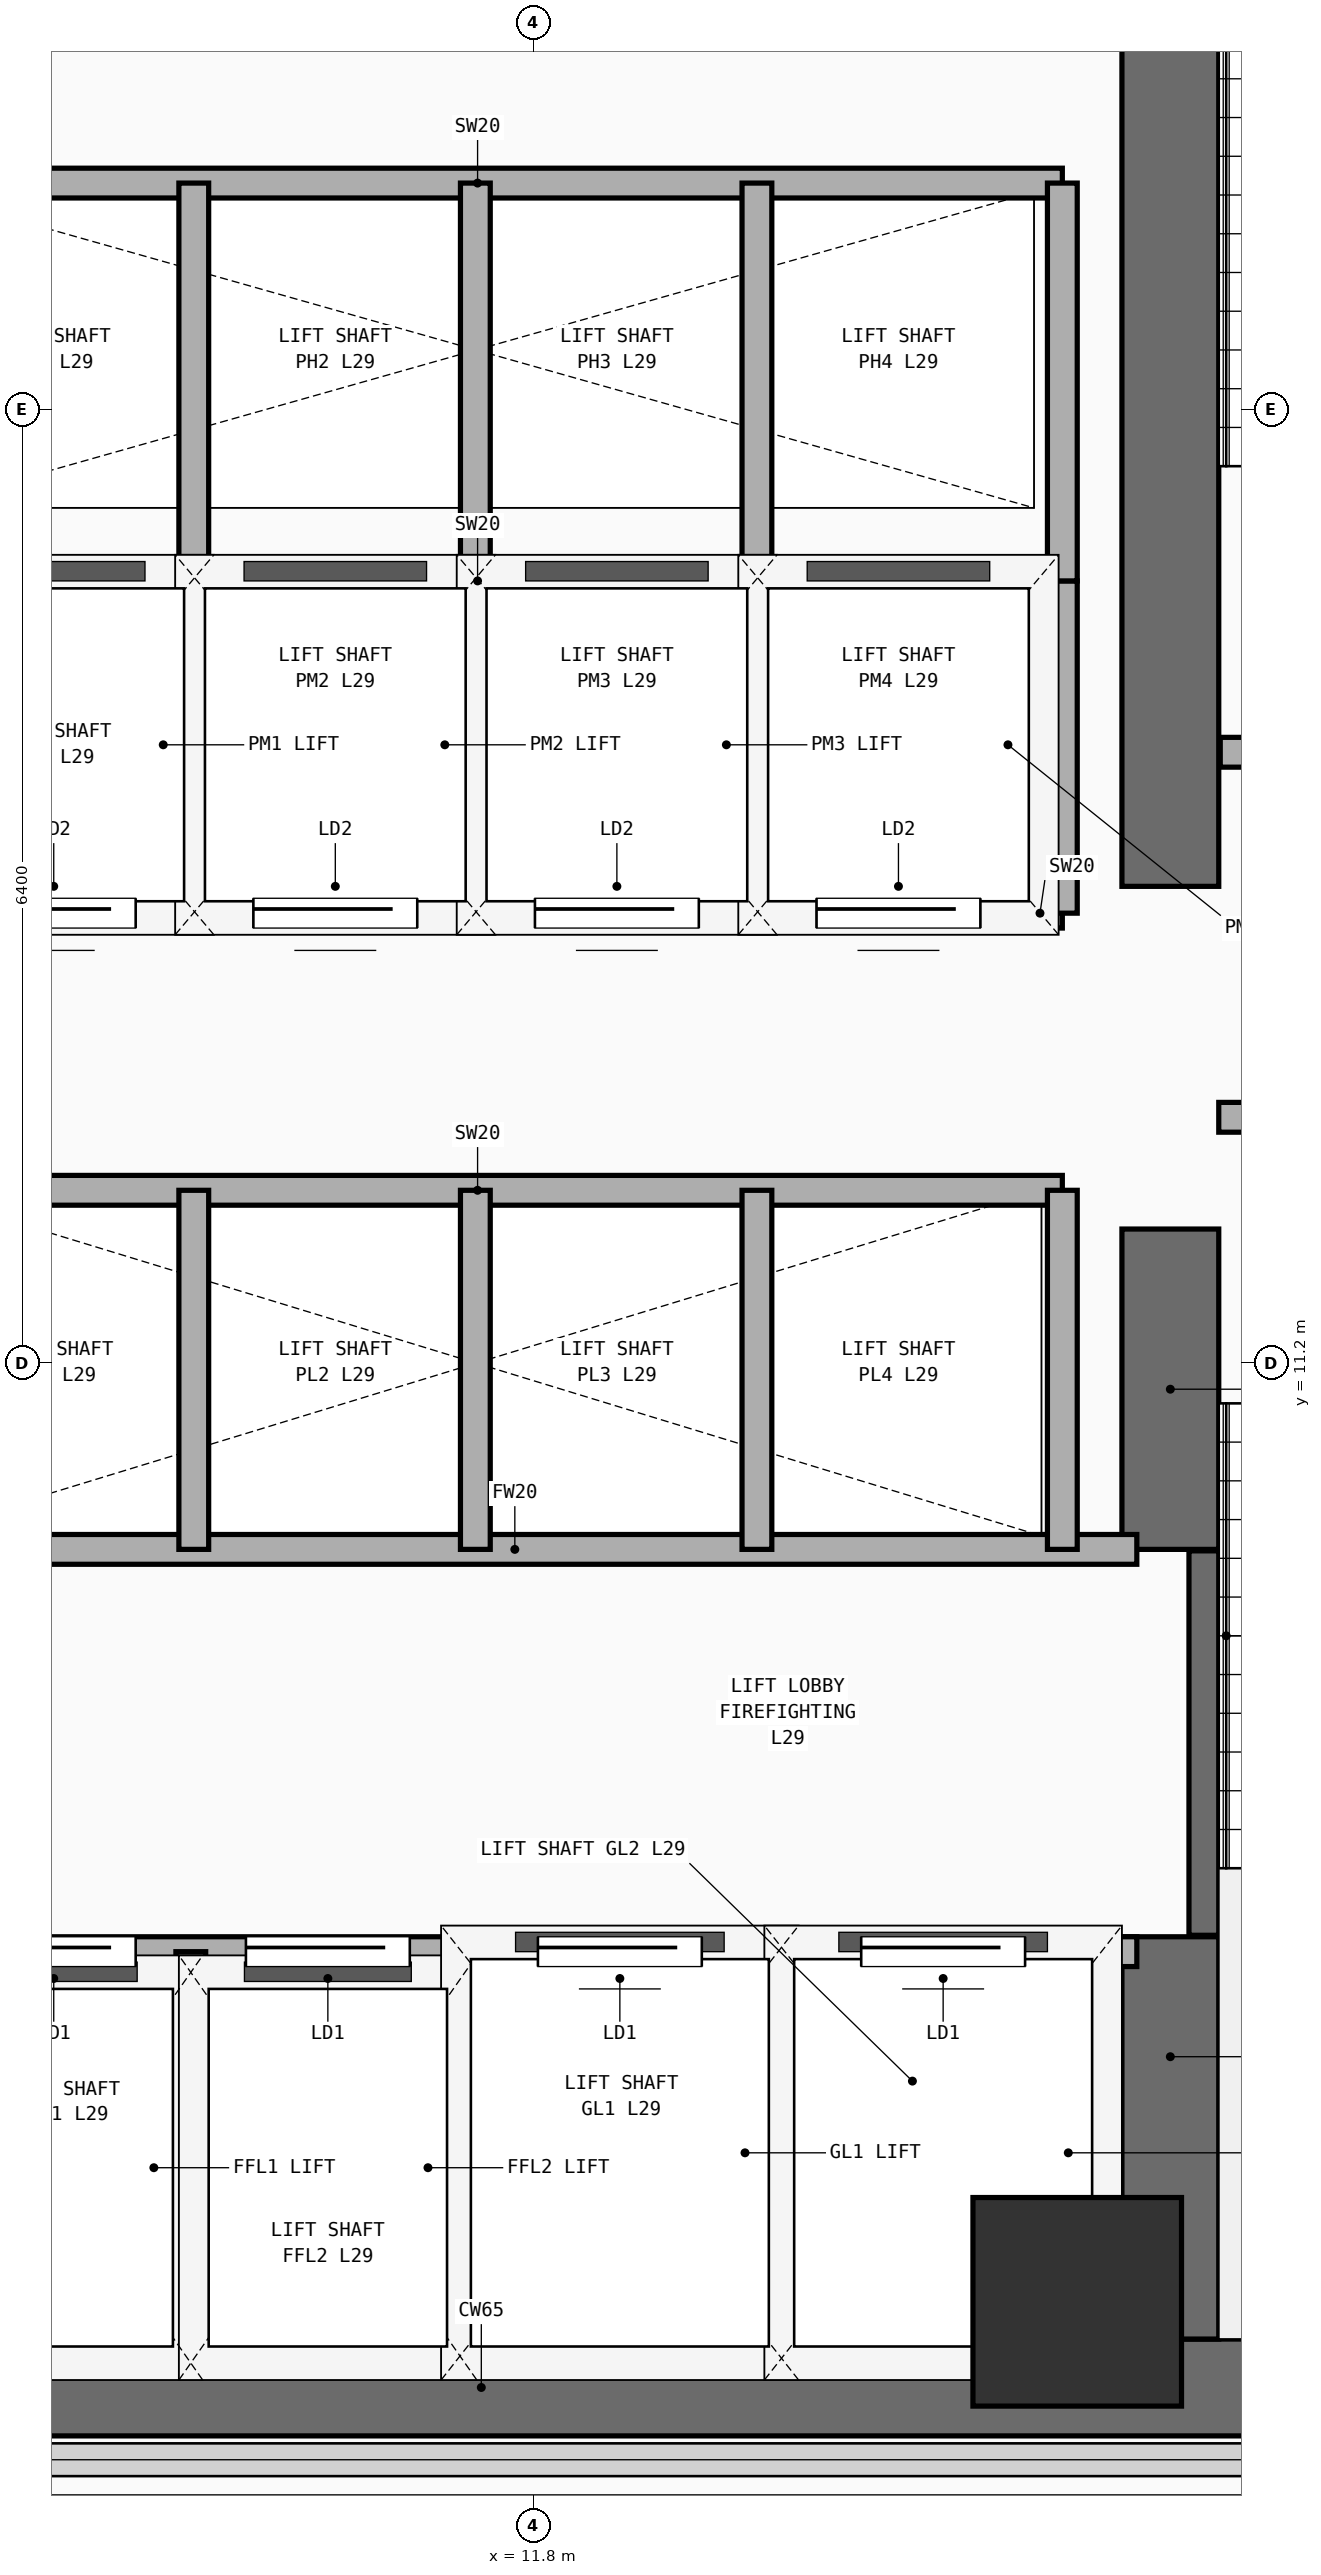
"""IFC4 building model, lengths in metres.
Left out: names, types, materials, properties, quantities, classifications, styles, units other than length and angle.
Written with IfcOpenShell. Run it as: python <this file> out.ifc"""

import sys

from ifc_helpers import new_model, si_unit, direction, frame, frame_2d, origin, origin_2d, place, context, subcontext, project, spatial, rectangle, extrude, element, fill, save


model = new_model("IFC4")
c1 = context("Model", 3, precision=1e-05, world=origin(), true_north=direction((0.0, 1.0)))
c2 = subcontext(c1, "Body", "Model", "MODEL_VIEW")
j1 = project(units=[si_unit("LENGTHUNIT", "METRE"), si_unit("PLANEANGLEUNIT", "RADIAN")], contexts=[c1])
p1 = place(None, origin())
s1 = spatial("IfcSite", under=j1, at=p1, CompositionType="ELEMENT")
p2 = place(p1, origin())
s2 = spatial("IfcBuilding", under=s1, at=p2, CompositionType="ELEMENT")
p3 = place(p2, frame((0.0, 0.0, 114.5)))
s3 = spatial("IfcBuildingStorey", under=s2, at=p3, CompositionType="ELEMENT", Elevation=114.5)
p4 = place(p3, frame((7.125, 4.325, 0.0), z_axis=(0.0, 0.0, 1.0), x_axis=(1.0, 0.0, 0.0)))
e1 = element("IfcWall", 1, at=p4, inside=s3, PredefinedType="SHEAR", context=c2, shape_type="SweptSolid", body=[
    extrude(rectangle(XDim=14.0, YDim=0.65, at=frame_2d((7.0, 0.0))), origin(), (0.0, 0.0, 1.0), 3.54),
])
p5 = place(p3, frame((16.075, 4.65, 0.0), z_axis=(0.0, 0.0, 1.0), x_axis=(0.0, 1.0, 0.0)))
e2 = element("IfcWall", 2, at=p5, inside=s3, PredefinedType="SHEAR", context=c2, shape_type="SweptSolid", body=[
    extrude(rectangle(XDim=2.7, YDim=0.65, at=frame_2d((1.35, 0.0))), origin(), (0.0, 0.0, 1.0), 3.54),
])
p6 = place(p3, frame((16.075, 9.95, 0.0), z_axis=(0.0, 0.0, 1.0), x_axis=(0.0, 1.0, 0.0)))
e3 = element("IfcWall", 3, at=p6, inside=s3, PredefinedType="SHEAR", context=c2, shape_type="SweptSolid", body=[
    extrude(rectangle(XDim=2.15, YDim=0.65, at=frame_2d((1.075, 0.0))), origin(), (0.0, 0.0, 1.0), 3.54),
])
p7 = place(p3, frame((16.075, 14.4, 0.0), z_axis=(0.0, 0.0, 1.0), x_axis=(0.0, 1.0, 0.0)))
e4 = element("IfcWall", 4, at=p7, inside=s3, PredefinedType="SHEAR", context=c2, shape_type="SweptSolid", body=[
    extrude(rectangle(XDim=9.1, YDim=0.65, at=frame_2d((4.55, 0.0))), origin(), (0.0, 0.0, 1.0), 3.54),
])
p8 = place(p3, frame((15.45, 4.9, 0.0), z_axis=(0.0, 0.0, 1.0), x_axis=(1.0, 0.0, 0.0)))
e5 = element("IfcColumn", 5, at=p8, inside=s3, PredefinedType="COLUMN", context=c2, shape_type="SweptSolid", body=[
    extrude(rectangle(XDim=1.4, YDim=1.4, at=origin_2d()), origin(), (0.0, 0.0, 1.0), 3.54),
])
p9 = place(p3, frame((16.3, 7.36, 0.0), z_axis=(0.0, 0.0, 1.0), x_axis=(0.0, 1.0, 0.0)))
e6 = element("IfcWall", 6, at=p9, inside=s3, PredefinedType="SHEAR", context=c2, shape_type="SweptSolid", body=[
    extrude(rectangle(XDim=2.58, YDim=0.2, at=frame_2d((1.29, 0.0))), origin(), (0.0, 0.0, 1.0), 3.54),
])
p10 = place(p3, frame((16.4, 12.85, 0.0), z_axis=(0.0, 0.0, 1.0), x_axis=(1.0, 0.0, 0.0)))
e7 = element("IfcWall", 7, at=p10, inside=s3, PredefinedType="PARTITIONING", context=c2, shape_type="SweptSolid", body=[
    extrude(rectangle(XDim=3.96, YDim=0.2, at=frame_2d((1.98, 0.0))), origin(), (0.0, 0.0, 1.0), 3.54),
])
p11 = place(p10, frame((1.304, 0.0, 0.0)))
e8 = element("IfcOpeningElement", 8, at=p11, cuts=e7, PredefinedType="OPENING", context=c2, shape_type="SweptSolid", body=[
    extrude(rectangle(XDim=1.1, YDim=2.2, at=frame_2d((0.55, 1.1))), frame((0.0, 0.11, 0.0), z_axis=(0.0, -1.0, 0.0), x_axis=(1.0, 0.0, 0.0)), (0.0, 0.0, 1.0), 0.22),
])
p12 = place(p3, frame((16.41, 15.3, 0.0), z_axis=(0.0, 0.0, 1.0), x_axis=(1.0, 0.0, 0.0)))
e9 = element("IfcWall", 9, at=p12, inside=s3, PredefinedType="PARTITIONING", context=c2, shape_type="SweptSolid", body=[
    extrude(rectangle(XDim=3.95, YDim=0.2, at=frame_2d((1.975, 0.0))), origin(), (0.0, 0.0, 1.0), 3.54),
])
p13 = place(p12, frame((1.294, 0.0, 0.0)))
e10 = element("IfcOpeningElement", 10, at=p13, cuts=e9, PredefinedType="OPENING", context=c2, shape_type="SweptSolid", body=[
    extrude(rectangle(XDim=1.1, YDim=2.2, at=frame_2d((0.55, 1.1))), frame((0.0, 0.11, 0.0), z_axis=(0.0, -1.0, 0.0), x_axis=(1.0, 0.0, 0.0)), (0.0, 0.0, 1.0), 0.22),
])
p14 = place(p3, frame((7.5, 7.25, 0.0), z_axis=(0.0, 0.0, 1.0), x_axis=(1.0, 0.0, 0.0)))
e11 = element("IfcWall", 11, at=p14, inside=s3, PredefinedType="PARTITIONING", context=c2, shape_type="SweptSolid", body=[
    extrude(rectangle(XDim=8.35, YDim=0.2, at=frame_2d((4.175, 0.0))), origin(), (0.0, 0.0, 1.0), 3.54),
])
p15 = place(p14, frame((0.53, 0.0, 0.0)))
e12 = element("IfcOpeningElement", 12, at=p15, cuts=e11, PredefinedType="OPENING", context=c2, shape_type="SweptSolid", body=[
    extrude(rectangle(XDim=1.1, YDim=2.2, at=frame_2d((0.55, 1.1))), frame((0.0, 0.11, 0.0), z_axis=(0.0, -1.0, 0.0), x_axis=(1.0, 0.0, 0.0)), (0.0, 0.0, 1.0), 0.22),
])
p16 = place(p14, frame((2.37, 0.0, 0.0)))
e13 = element("IfcOpeningElement", 13, at=p16, cuts=e11, PredefinedType="OPENING", context=c2, shape_type="SweptSolid", body=[
    extrude(rectangle(XDim=1.1, YDim=2.2, at=frame_2d((0.55, 1.1))), frame((0.0, 0.11, 0.0), z_axis=(0.0, -1.0, 0.0), x_axis=(1.0, 0.0, 0.0)), (0.0, 0.0, 1.0), 0.22),
])
p17 = place(p14, frame((4.33, 0.0, 0.0)))
e14 = element("IfcOpeningElement", 14, at=p17, cuts=e11, PredefinedType="OPENING", context=c2, shape_type="SweptSolid", body=[
    extrude(rectangle(XDim=1.1, YDim=2.2, at=frame_2d((0.55, 1.1))), frame((0.0, 0.11, 0.0), z_axis=(0.0, -1.0, 0.0), x_axis=(1.0, 0.0, 0.0)), (0.0, 0.0, 1.0), 0.22),
])
p18 = place(p14, frame((6.5, 0.0, 0.0)))
e15 = element("IfcOpeningElement", 15, at=p18, cuts=e11, PredefinedType="OPENING", context=c2, shape_type="SweptSolid", body=[
    extrude(rectangle(XDim=1.1, YDim=2.2, at=frame_2d((0.55, 1.1))), frame((0.0, 0.11, 0.0), z_axis=(0.0, -1.0, 0.0), x_axis=(1.0, 0.0, 0.0)), (0.0, 0.0, 1.0), 0.22),
])
p19 = place(p3, frame((7.5, 9.95, 0.0), z_axis=(0.0, 0.0, 1.0), x_axis=(1.0, 0.0, 0.0)))
e16 = element("IfcWall", 16, at=p19, inside=s3, PredefinedType="PARTITIONING", context=c2, shape_type="SweptSolid", body=[
    extrude(rectangle(XDim=8.35, YDim=0.2, at=frame_2d((4.175, 0.0))), origin(), (0.0, 0.0, 1.0), 3.54),
])
for number, where, z_axis, x_axis in (
    (17, (9.5, 4.45, 0.0), (0.0, 0.0, 1.0), (0.0, 1.0, 0.0)),
    (18, (11.36, 4.45, 0.0), (0.0, 0.0, 1.0), (0.0, 1.0, 0.0)),
    (19, (13.46, 4.45, 0.0), (0.0, 0.0, 1.0), (0.0, 1.0, 0.0)),
):
    element("IfcWall", number, at=place(p3, frame(where, z_axis=z_axis, x_axis=x_axis)), inside=s3, PredefinedType="PARTITIONING", context=c2, shape_type="SweptSolid", body=[
        extrude(rectangle(XDim=2.8, YDim=0.2, at=frame_2d((1.4, 0.0))), origin(), (0.0, 0.0, 1.0), 3.54),
    ])
p20 = place(p3, frame((7.5, 12.36, 0.0), z_axis=(0.0, 0.0, 1.0), x_axis=(1.0, 0.0, 0.0)))
e20 = element("IfcWall", 20, at=p20, inside=s3, PredefinedType="PARTITIONING", context=c2, shape_type="SweptSolid", body=[
    extrude(rectangle(XDim=7.85, YDim=0.2, at=frame_2d((3.925, 0.0))), origin(), (0.0, 0.0, 1.0), 3.54),
])
for number, where, z_axis, x_axis in (
    (21, (15.35, 9.95, 0.0), (0.0, 0.0, 1.0), (0.0, 1.0, 0.0)),
    (22, (9.52, 9.95, 0.0), (0.0, 0.0, 1.0), (0.0, 1.0, 0.0)),
    (23, (11.41, 9.95, 0.0), (0.0, 0.0, 1.0), (0.0, 1.0, 0.0)),
    (24, (13.3, 9.95, 0.0), (0.0, 0.0, 1.0), (0.0, 1.0, 0.0)),
):
    element("IfcWall", number, at=place(p3, frame(where, z_axis=z_axis, x_axis=x_axis)), inside=s3, PredefinedType="PARTITIONING", context=c2, shape_type="SweptSolid", body=[
        extrude(rectangle(XDim=2.41, YDim=0.2, at=frame_2d((1.205, 0.0))), origin(), (0.0, 0.0, 1.0), 3.54),
    ])
p21 = place(p3, frame((7.5, 14.22, 0.0), z_axis=(0.0, 0.0, 1.0), x_axis=(1.0, 0.0, 0.0)))
e25 = element("IfcWall", 25, at=p21, inside=s3, PredefinedType="PARTITIONING", context=c2, shape_type="SweptSolid", body=[
    extrude(rectangle(XDim=7.85, YDim=0.2, at=frame_2d((3.925, 0.0))), origin(), (0.0, 0.0, 1.0), 3.54),
])
p22 = place(p21, frame((0.53, 0.0, 0.0)))
e26 = element("IfcOpeningElement", 26, at=p22, cuts=e25, PredefinedType="OPENING", context=c2, shape_type="SweptSolid", body=[
    extrude(rectangle(XDim=1.1, YDim=2.2, at=frame_2d((0.55, 1.1))), frame((0.0, 0.11, 0.0), z_axis=(0.0, -1.0, 0.0), x_axis=(1.0, 0.0, 0.0)), (0.0, 0.0, 1.0), 0.22),
])
p23 = place(p21, frame((2.42, 0.0, 0.0)))
e27 = element("IfcOpeningElement", 27, at=p23, cuts=e25, PredefinedType="OPENING", context=c2, shape_type="SweptSolid", body=[
    extrude(rectangle(XDim=1.1, YDim=2.2, at=frame_2d((0.55, 1.1))), frame((0.0, 0.11, 0.0), z_axis=(0.0, -1.0, 0.0), x_axis=(1.0, 0.0, 0.0)), (0.0, 0.0, 1.0), 0.22),
])
p24 = place(p21, frame((4.31, 0.0, 0.0)))
e28 = element("IfcOpeningElement", 28, at=p24, cuts=e25, PredefinedType="OPENING", context=c2, shape_type="SweptSolid", body=[
    extrude(rectangle(XDim=1.1, YDim=2.2, at=frame_2d((0.55, 1.1))), frame((0.0, 0.11, 0.0), z_axis=(0.0, -1.0, 0.0), x_axis=(1.0, 0.0, 0.0)), (0.0, 0.0, 1.0), 0.22),
])
p25 = place(p21, frame((6.2, 0.0, 0.0)))
e29 = element("IfcOpeningElement", 29, at=p25, cuts=e25, PredefinedType="OPENING", context=c2, shape_type="SweptSolid", body=[
    extrude(rectangle(XDim=1.1, YDim=2.2, at=frame_2d((0.55, 1.1))), frame((0.0, 0.11, 0.0), z_axis=(0.0, -1.0, 0.0), x_axis=(1.0, 0.0, 0.0)), (0.0, 0.0, 1.0), 0.22),
])
p26 = place(p3, frame((7.5, 16.45, 0.0), z_axis=(0.0, 0.0, 1.0), x_axis=(1.0, 0.0, 0.0)))
e30 = element("IfcWall", 30, at=p26, inside=s3, PredefinedType="PARTITIONING", context=c2, shape_type="SweptSolid", body=[
    extrude(rectangle(XDim=7.85, YDim=0.2, at=frame_2d((3.925, 0.0))), origin(), (0.0, 0.0, 1.0), 3.54),
])
for number, where, z_axis, x_axis in (
    (31, (15.35, 14.22, 0.0), (0.0, 0.0, 1.0), (0.0, 1.0, 0.0)),
    (32, (9.52, 14.22, 0.0), (0.0, 0.0, 1.0), (0.0, 1.0, 0.0)),
    (33, (11.41, 14.22, 0.0), (0.0, 0.0, 1.0), (0.0, 1.0, 0.0)),
    (34, (13.3, 14.22, 0.0), (0.0, 0.0, 1.0), (0.0, 1.0, 0.0)),
):
    element("IfcWall", number, at=place(p3, frame(where, z_axis=z_axis, x_axis=x_axis)), inside=s3, PredefinedType="PARTITIONING", context=c2, shape_type="SweptSolid", body=[
        extrude(rectangle(XDim=2.23, YDim=0.2, at=frame_2d((1.115, 0.0))), origin(), (0.0, 0.0, 1.0), 3.54),
    ])
p27 = place(p3, frame((7.5, 19.12, 0.0), z_axis=(0.0, 0.0, 1.0), x_axis=(1.0, 0.0, 0.0)))
e35 = element("IfcWall", 35, at=p27, inside=s3, PredefinedType="PARTITIONING", context=c2, shape_type="SweptSolid", body=[
    extrude(rectangle(XDim=7.85, YDim=0.2, at=frame_2d((3.925, 0.0))), origin(), (0.0, 0.0, 1.0), 3.54),
])
for number, where, z_axis, x_axis in (
    (36, (15.35, 16.45, 0.0), (0.0, 0.0, 1.0), (0.0, 1.0, 0.0)),
    (37, (9.52, 16.45, 0.0), (0.0, 0.0, 1.0), (0.0, 1.0, 0.0)),
    (38, (11.41, 16.45, 0.0), (0.0, 0.0, 1.0), (0.0, 1.0, 0.0)),
    (39, (13.3, 16.45, 0.0), (0.0, 0.0, 1.0), (0.0, 1.0, 0.0)),
):
    element("IfcWall", number, at=place(p3, frame(where, z_axis=z_axis, x_axis=x_axis)), inside=s3, PredefinedType="PARTITIONING", context=c2, shape_type="SweptSolid", body=[
        extrude(rectangle(XDim=2.67, YDim=0.2, at=frame_2d((1.335, 0.0))), origin(), (0.0, 0.0, 1.0), 3.54),
    ])
p28 = place(p15, origin())
e40 = element("IfcDoor", 40, at=p28, inside=s3, OperationType="SLIDING_TO_LEFT", PredefinedType="DOOR", context=c2, shape_type="SweptSolid", body=[
    extrude(rectangle(XDim=1.1, YDim=2.2, at=frame_2d((0.55, 1.1))), frame((0.0, 0.025, 0.0), z_axis=(0.0, -1.0, 0.0), x_axis=(1.0, 0.0, 0.0)), (0.0, 0.0, 1.0), 0.05),
])
fill(e12, e40)
p29 = place(p16, origin())
e41 = element("IfcDoor", 41, at=p29, inside=s3, OperationType="SLIDING_TO_LEFT", PredefinedType="DOOR", context=c2, shape_type="SweptSolid", body=[
    extrude(rectangle(XDim=1.1, YDim=2.2, at=frame_2d((0.55, 1.1))), frame((0.0, 0.025, 0.0), z_axis=(0.0, -1.0, 0.0), x_axis=(1.0, 0.0, 0.0)), (0.0, 0.0, 1.0), 0.05),
])
fill(e13, e41)
p30 = place(p17, origin())
e42 = element("IfcDoor", 42, at=p30, inside=s3, OperationType="SLIDING_TO_LEFT", PredefinedType="DOOR", context=c2, shape_type="SweptSolid", body=[
    extrude(rectangle(XDim=1.1, YDim=2.2, at=frame_2d((0.55, 1.1))), frame((0.0, 0.025, 0.0), z_axis=(0.0, -1.0, 0.0), x_axis=(1.0, 0.0, 0.0)), (0.0, 0.0, 1.0), 0.05),
])
fill(e14, e42)
p31 = place(p18, origin())
e43 = element("IfcDoor", 43, at=p31, inside=s3, OperationType="SLIDING_TO_LEFT", PredefinedType="DOOR", context=c2, shape_type="SweptSolid", body=[
    extrude(rectangle(XDim=1.1, YDim=2.2, at=frame_2d((0.55, 1.1))), frame((0.0, 0.025, 0.0), z_axis=(0.0, -1.0, 0.0), x_axis=(1.0, 0.0, 0.0)), (0.0, 0.0, 1.0), 0.05),
])
fill(e15, e43)
p32 = place(p22, frame((1.1, 0.0, 0.0), z_axis=(0.0, 0.0, 1.0), x_axis=(-1.0, 0.0, 0.0)))
e44 = element("IfcDoor", 44, at=p32, inside=s3, OperationType="SLIDING_TO_LEFT", PredefinedType="DOOR", context=c2, shape_type="SweptSolid", body=[
    extrude(rectangle(XDim=1.1, YDim=2.2, at=frame_2d((0.55, 1.1))), frame((0.0, 0.025, 0.0), z_axis=(0.0, -1.0, 0.0), x_axis=(1.0, 0.0, 0.0)), (0.0, 0.0, 1.0), 0.05),
])
fill(e26, e44)
p33 = place(p23, frame((1.1, 0.0, 0.0), z_axis=(0.0, 0.0, 1.0), x_axis=(-1.0, 0.0, 0.0)))
e45 = element("IfcDoor", 45, at=p33, inside=s3, OperationType="SLIDING_TO_LEFT", PredefinedType="DOOR", context=c2, shape_type="SweptSolid", body=[
    extrude(rectangle(XDim=1.1, YDim=2.2, at=frame_2d((0.55, 1.1))), frame((0.0, 0.025, 0.0), z_axis=(0.0, -1.0, 0.0), x_axis=(1.0, 0.0, 0.0)), (0.0, 0.0, 1.0), 0.05),
])
fill(e27, e45)
p34 = place(p24, frame((1.1, 0.0, 0.0), z_axis=(0.0, 0.0, 1.0), x_axis=(-1.0, 0.0, 0.0)))
e46 = element("IfcDoor", 46, at=p34, inside=s3, OperationType="SLIDING_TO_LEFT", PredefinedType="DOOR", context=c2, shape_type="SweptSolid", body=[
    extrude(rectangle(XDim=1.1, YDim=2.2, at=frame_2d((0.55, 1.1))), frame((0.0, 0.025, 0.0), z_axis=(0.0, -1.0, 0.0), x_axis=(1.0, 0.0, 0.0)), (0.0, 0.0, 1.0), 0.05),
])
fill(e28, e46)
p35 = place(p25, frame((1.1, 0.0, 0.0), z_axis=(0.0, 0.0, 1.0), x_axis=(-1.0, 0.0, 0.0)))
e47 = element("IfcDoor", 47, at=p35, inside=s3, OperationType="SLIDING_TO_LEFT", PredefinedType="DOOR", context=c2, shape_type="SweptSolid", body=[
    extrude(rectangle(XDim=1.1, YDim=2.2, at=frame_2d((0.55, 1.1))), frame((0.0, 0.025, 0.0), z_axis=(0.0, -1.0, 0.0), x_axis=(1.0, 0.0, 0.0)), (0.0, 0.0, 1.0), 0.05),
])
fill(e29, e47)
save(model, sys.argv[1])
